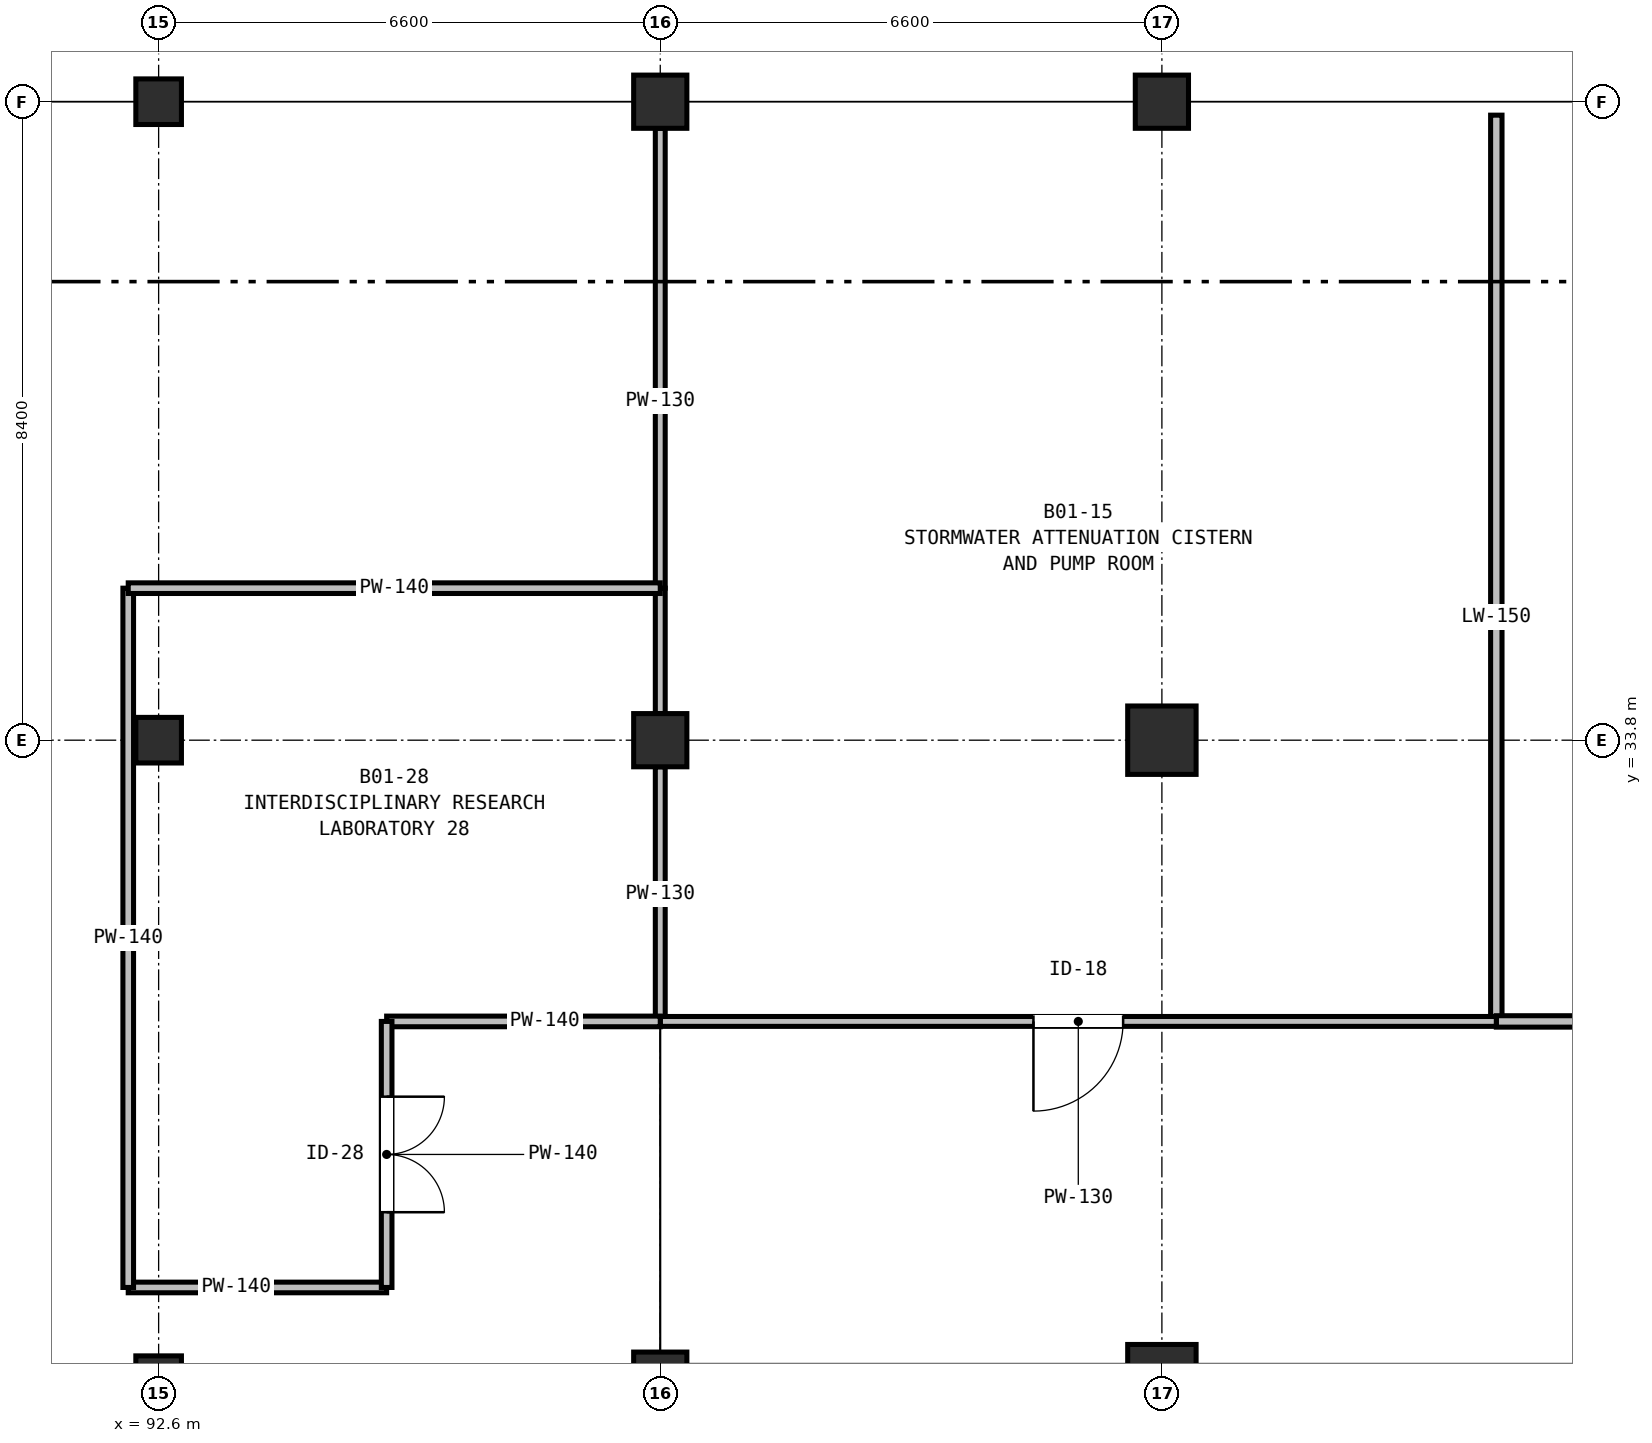
"""IFC4 building model, lengths in metres.
Left out: names, types, materials, properties, quantities, classifications, styles, units other than length and angle.
Written with IfcOpenShell. Run it as: python <this file> out.ifc"""

import sys

from ifc_helpers import new_model, si_unit, direction, frame, frame_2d, origin, origin_2d, place, context, subcontext, project, spatial, rectangle, extrude, element, fill, save


model = new_model("IFC4")
c1 = context("Model", 3, precision=1e-05, world=origin(), true_north=direction((0.0, 1.0)))
c2 = subcontext(c1, "Body", "Model", "MODEL_VIEW")
j1 = project(units=[si_unit("LENGTHUNIT", "METRE"), si_unit("PLANEANGLEUNIT", "RADIAN")], contexts=[c1])
p1 = place(None, origin())
s1 = spatial("IfcSite", under=j1, at=p1, CompositionType="ELEMENT")
p2 = place(p1, origin())
s2 = spatial("IfcBuilding", under=s1, at=p2, CompositionType="ELEMENT")
p3 = place(p2, frame((0.0, 0.0, -4.5)))
s3 = spatial("IfcBuildingStorey", under=s2, at=p3, CompositionType="ELEMENT", Elevation=-4.5)
for number, where, z_axis, x_axis in (
    (1, (92.6, 25.4, 0.0), (0.0, 0.0, 1.0), (1.0, 0.0, 0.0)),
    (2, (92.6, 33.8, 0.0), (0.0, 0.0, 1.0), (1.0, 0.0, 0.0)),
    (3, (92.6, 42.2, 0.0), (0.0, 0.0, 1.0), (1.0, 0.0, 0.0)),
):
    element("IfcColumn", number, at=place(p3, frame(where, z_axis=z_axis, x_axis=x_axis)), inside=s3, PredefinedType="COLUMN", context=c2, shape_type="SweptSolid", body=[
        extrude(rectangle(XDim=0.6, YDim=0.6, at=origin_2d()), origin(), (0.0, 0.0, 1.0), 4.44),
    ])
for number, where, z_axis, x_axis in (
    (4, (99.2, 25.4, 0.0), (0.0, 0.0, 1.0), (1.0, 0.0, 0.0)),
    (5, (99.2, 33.8, 0.0), (0.0, 0.0, 1.0), (1.0, 0.0, 0.0)),
    (6, (99.2, 42.2, 0.0), (0.0, 0.0, 1.0), (1.0, 0.0, 0.0)),
):
    element("IfcColumn", number, at=place(p3, frame(where, z_axis=z_axis, x_axis=x_axis)), inside=s3, PredefinedType="COLUMN", context=c2, shape_type="SweptSolid", body=[
        extrude(rectangle(XDim=0.7, YDim=0.7, at=origin_2d()), origin(), (0.0, 0.0, 1.0), 4.5),
    ])
for number, where, z_axis, x_axis in (
    (7, (105.8, 25.4, 0.0), (0.0, 0.0, 1.0), (1.0, 0.0, 0.0)),
    (8, (105.8, 33.8, 0.0), (0.0, 0.0, 1.0), (1.0, 0.0, 0.0)),
):
    element("IfcColumn", number, at=place(p3, frame(where, z_axis=z_axis, x_axis=x_axis)), inside=s3, PredefinedType="COLUMN", context=c2, shape_type="SweptSolid", body=[
        extrude(rectangle(XDim=0.9, YDim=0.9, at=origin_2d()), origin(), (0.0, 0.0, 1.0), 4.5),
    ])
p4 = place(p3, frame((105.8, 42.2, 0.0), z_axis=(0.0, 0.0, 1.0), x_axis=(1.0, 0.0, 0.0)))
e9 = element("IfcColumn", 9, at=p4, inside=s3, PredefinedType="COLUMN", context=c2, shape_type="SweptSolid", body=[
    extrude(rectangle(XDim=0.7, YDim=0.7, at=origin_2d()), origin(), (0.0, 0.0, 1.0), 4.5),
])
p5 = place(p3, frame((33.025, 42.2, 0.0), z_axis=(0.0, 0.0, 1.0), x_axis=(1.0, 0.0, 0.0)))
e10 = element("IfcWall", 10, at=p5, inside=s3, PredefinedType="SOLIDWALL", context=c2, shape_type="SweptSolid", body=[
    extrude(rectangle(XDim=66.35, YDim=0.35, at=frame_2d((33.175, 0.0))), origin(), (0.0, 0.0, 1.0), 4.5),
])
p6 = place(p3, frame((99.025, 42.2, 0.0), z_axis=(0.0, 0.0, 1.0), x_axis=(1.0, 0.0, 0.0)))
e11 = element("IfcWall", 11, at=p6, inside=s3, PredefinedType="SOLIDWALL", context=c2, shape_type="SweptSolid", body=[
    extrude(rectangle(XDim=33.35, YDim=0.35, at=frame_2d((16.675, 0.0))), origin(), (0.0, 0.0, 1.0), 4.5),
])
p7 = place(p3, frame((110.2, 30.1, 0.0), z_axis=(0.0, 0.0, 1.0), x_axis=(0.0, 1.0, 0.0)))
e12 = element("IfcWall", 12, at=p7, inside=s3, PredefinedType="PARTITIONING", context=c2, shape_type="SweptSolid", body=[
    extrude(rectangle(XDim=11.923, YDim=0.15, at=frame_2d((5.961, 0.0))), origin(), (0.0, 0.0, 1.0), 3.535),
])
p8 = place(p3, frame((120.798, 30.1, 0.0), z_axis=(0.0, 0.0, 1.0), x_axis=(-1.0, 0.0, 0.0)))
e13 = element("IfcWall", 13, at=p8, inside=s3, PredefinedType="PARTITIONING", context=c2, shape_type="SweptSolid", body=[
    extrude(rectangle(XDim=10.598, YDim=0.15, at=frame_2d((5.299, 0.0))), origin(), (0.0, 0.0, 1.0), 3.635),
])
p9 = place(p8, frame((4.799, 0.0, 0.0)))
e14 = element("IfcOpeningElement", 14, at=p9, cuts=e13, PredefinedType="OPENING", context=c2, shape_type="SweptSolid", body=[
    extrude(rectangle(XDim=1.0, YDim=2.1, at=frame_2d((0.5, 1.05))), frame((0.0, 0.085, 0.0), z_axis=(0.0, -1.0, 0.0), x_axis=(1.0, 0.0, 0.0)), (0.0, 0.0, 1.0), 0.17),
])
p10 = place(p3, frame((99.2, 30.1, 0.0), z_axis=(0.0, 0.0, 1.0), x_axis=(0.0, 1.0, 0.0)))
e15 = element("IfcWall", 15, at=p10, inside=s3, PredefinedType="PARTITIONING", context=c2, shape_type="SweptSolid", body=[
    extrude(rectangle(XDim=3.35, YDim=0.13, at=frame_2d((1.675, 0.0))), origin(), (0.0, 0.0, 1.0), 3.635),
])
p11 = place(p3, frame((99.2, 34.15, 0.0), z_axis=(0.0, 0.0, 1.0), x_axis=(0.0, 1.0, 0.0)))
e16 = element("IfcWall", 16, at=p11, inside=s3, PredefinedType="PARTITIONING", context=c2, shape_type="SweptSolid", body=[
    extrude(rectangle(XDim=1.65, YDim=0.13, at=frame_2d((0.825, 0.0))), origin(), (0.0, 0.0, 1.0), 3.635),
])
p12 = place(p3, frame((99.2, 35.8, 0.0), z_axis=(0.0, 0.0, 1.0), x_axis=(0.0, 1.0, 0.0)))
e17 = element("IfcWall", 17, at=p12, inside=s3, PredefinedType="PARTITIONING", context=c2, shape_type="SweptSolid", body=[
    extrude(rectangle(XDim=6.05, YDim=0.13, at=frame_2d((3.025, 0.0))), origin(), (0.0, 0.0, 1.0), 3.635),
])
p13 = place(p3, frame((110.2, 30.1, 0.0), z_axis=(0.0, 0.0, 1.0), x_axis=(-1.0, 0.0, 0.0)))
e18 = element("IfcWall", 18, at=p13, inside=s3, PredefinedType="PARTITIONING", context=c2, shape_type="SweptSolid", body=[
    extrude(rectangle(XDim=11.0, YDim=0.13, at=frame_2d((5.5, 0.0))), origin(), (0.0, 0.0, 1.0), 3.635),
])
p14 = place(p13, frame((4.91, 0.0, 0.0)))
e19 = element("IfcOpeningElement", 19, at=p14, cuts=e18, PredefinedType="OPENING", context=c2, shape_type="SweptSolid", body=[
    extrude(rectangle(XDim=1.18, YDim=2.1, at=frame_2d((0.59, 1.05))), frame((0.0, 0.075, 0.0), z_axis=(0.0, -1.0, 0.0), x_axis=(1.0, 0.0, 0.0)), (0.0, 0.0, 1.0), 0.15),
])
p15 = place(p3, frame((95.6, 26.6, 0.0), z_axis=(0.0, 0.0, 1.0), x_axis=(-1.0, 0.0, 0.0)))
e20 = element("IfcWall", 20, at=p15, inside=s3, PredefinedType="PARTITIONING", context=c2, shape_type="SweptSolid", body=[
    extrude(rectangle(XDim=3.4, YDim=0.14, at=frame_2d((1.7, 0.0))), origin(), (0.0, 0.0, 1.0), 3.635),
])
p16 = place(p3, frame((92.2, 26.6, 0.0), z_axis=(0.0, 0.0, 1.0), x_axis=(0.0, 1.0, 0.0)))
e21 = element("IfcWall", 21, at=p16, inside=s3, PredefinedType="PARTITIONING", context=c2, shape_type="SweptSolid", body=[
    extrude(rectangle(XDim=9.2, YDim=0.14, at=frame_2d((4.6, 0.0))), origin(), (0.0, 0.0, 1.0), 3.835),
])
p17 = place(p3, frame((92.2, 35.8, 0.0), z_axis=(0.0, 0.0, 1.0), x_axis=(1.0, 0.0, 0.0)))
e22 = element("IfcWall", 22, at=p17, inside=s3, PredefinedType="PARTITIONING", context=c2, shape_type="SweptSolid", body=[
    extrude(rectangle(XDim=7.0, YDim=0.14, at=frame_2d((3.5, 0.0))), origin(), (0.0, 0.0, 1.0), 3.635),
])
p18 = place(p3, frame((99.2, 30.1, 0.0), z_axis=(0.0, 0.0, 1.0), x_axis=(-1.0, 0.0, 0.0)))
e23 = element("IfcWall", 23, at=p18, inside=s3, PredefinedType="PARTITIONING", context=c2, shape_type="SweptSolid", body=[
    extrude(rectangle(XDim=3.6, YDim=0.14, at=frame_2d((1.8, 0.0))), origin(), (0.0, 0.0, 1.0), 3.635),
])
p19 = place(p3, frame((95.6, 30.1, 0.0), z_axis=(0.0, 0.0, 1.0), x_axis=(0.0, -1.0, 0.0)))
e24 = element("IfcWall", 24, at=p19, inside=s3, PredefinedType="PARTITIONING", context=c2, shape_type="SweptSolid", body=[
    extrude(rectangle(XDim=3.5, YDim=0.14, at=frame_2d((1.75, 0.0))), origin(), (0.0, 0.0, 1.0), 4.175),
])
p20 = place(p19, frame((0.99, 0.0, 0.0)))
e25 = element("IfcOpeningElement", 25, at=p20, cuts=e24, PredefinedType="OPENING", context=c2, shape_type="SweptSolid", body=[
    extrude(rectangle(XDim=1.52, YDim=2.14, at=frame_2d((0.76, 1.07))), frame((0.0, 0.08, 0.0), z_axis=(0.0, -1.0, 0.0), x_axis=(1.0, 0.0, 0.0)), (0.0, 0.0, 1.0), 0.16),
])
p21 = place(p14, origin())
e26 = element("IfcDoor", 26, at=p21, inside=s3, OperationType="SINGLE_SWING_RIGHT", PredefinedType="DOOR", context=c2, shape_type="SweptSolid", body=[
    extrude(rectangle(XDim=1.18, YDim=2.1, at=frame_2d((0.59, 1.05))), frame((0.0, 0.025, 0.0), z_axis=(0.0, -1.0, 0.0), x_axis=(1.0, 0.0, 0.0)), (0.0, 0.0, 1.0), 0.05),
])
fill(e19, e26)
p22 = place(p20, origin())
e27 = element("IfcDoor", 27, at=p22, inside=s3, OperationType="DOUBLE_DOOR_SINGLE_SWING", PredefinedType="DOOR", context=c2, shape_type="SweptSolid", body=[
    extrude(rectangle(XDim=1.52, YDim=2.14, at=frame_2d((0.76, 1.07))), frame((0.0, 0.025, 0.0), z_axis=(0.0, -1.0, 0.0), x_axis=(1.0, 0.0, 0.0)), (0.0, 0.0, 1.0), 0.05),
])
fill(e25, e27)
save(model, sys.argv[1])
